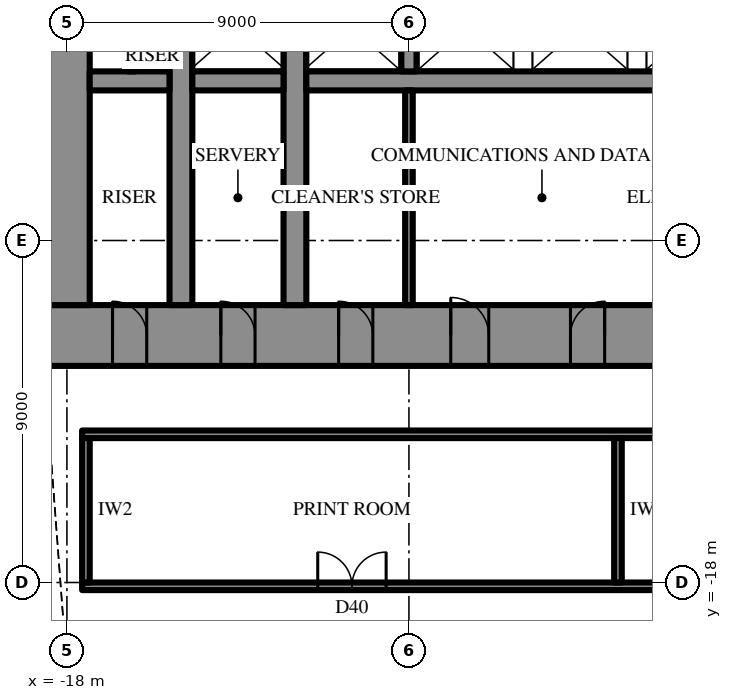
"""IFC4 building model, lengths in metres.
Left out: names, types, materials, properties, quantities, classifications, styles, units other than length and angle.
Written with IfcOpenShell. Run it as: python <this file> out.ifc"""

import sys

from ifc_helpers import new_model, si_unit, direction, frame, frame_2d, origin, place, context, subcontext, project, spatial, rectangle, extrude, element, fill, save


model = new_model("IFC4")
c1 = context("Model", 3, precision=1e-05, world=origin(), true_north=direction((0.0, 1.0)))
c2 = subcontext(c1, "Body", "Model", "MODEL_VIEW")
j1 = project(units=[si_unit("LENGTHUNIT", "METRE"), si_unit("PLANEANGLEUNIT", "RADIAN")], contexts=[c1])
p1 = place(None, origin())
s1 = spatial("IfcSite", under=j1, at=p1, CompositionType="ELEMENT")
p2 = place(p1, origin())
s2 = spatial("IfcBuilding", under=s1, at=p2, CompositionType="ELEMENT")
p3 = place(p2, frame((0.0, 0.0, 153.1)))
s3 = spatial("IfcBuildingStorey", under=s2, at=p3, CompositionType="ELEMENT", Elevation=153.1)
p4 = place(p3, frame((18.6, -11.5, 0.0), z_axis=(0.0, 0.0, 1.0), x_axis=(-1.0, 0.0, 0.0)))
e1 = element("IfcWall", 1, at=p4, inside=s3, PredefinedType="SHEAR", context=c2, shape_type="SweptSolid", body=[
    extrude(rectangle(XDim=37.2, YDim=1.6, at=frame_2d((18.6, 0.0))), origin(), (0.0, 0.0, 1.0), 4.2),
])
p5 = place(p4, frame((19.45, 0.0, 0.0)))
e2 = element("IfcOpeningElement", 2, at=p5, cuts=e1, PredefinedType="OPENING", context=c2, shape_type="SweptSolid", body=[
    extrude(rectangle(XDim=0.9, YDim=2.2, at=frame_2d((0.45, 1.1))), frame((0.0, 0.81, 0.0), z_axis=(0.0, -1.0, 0.0), x_axis=(1.0, 0.0, 0.0)), (0.0, 0.0, 1.0), 1.62),
])
p6 = place(p4, frame((22.45, 0.0, 0.0)))
e3 = element("IfcOpeningElement", 3, at=p6, cuts=e1, PredefinedType="OPENING", context=c2, shape_type="SweptSolid", body=[
    extrude(rectangle(XDim=0.9, YDim=2.2, at=frame_2d((0.45, 1.1))), frame((0.0, 0.81, 0.0), z_axis=(0.0, -1.0, 0.0), x_axis=(1.0, 0.0, 0.0)), (0.0, 0.0, 1.0), 1.62),
])
p7 = place(p4, frame((25.5, 0.0, 0.0)))
e4 = element("IfcOpeningElement", 4, at=p7, cuts=e1, PredefinedType="OPENING", context=c2, shape_type="SweptSolid", body=[
    extrude(rectangle(XDim=1.0, YDim=2.2, at=frame_2d((0.5, 1.1))), frame((0.0, 0.81, 0.0), z_axis=(0.0, -1.0, 0.0), x_axis=(1.0, 0.0, 0.0)), (0.0, 0.0, 1.0), 1.62),
])
p8 = place(p4, frame((1.8, 0.0, 0.0)))
e5 = element("IfcOpeningElement", 5, at=p8, cuts=e1, PredefinedType="OPENING", context=c2, shape_type="SweptSolid", body=[
    extrude(rectangle(XDim=0.9, YDim=2.2, at=frame_2d((0.45, 1.1))), frame((0.0, 0.81, 0.0), z_axis=(0.0, -1.0, 0.0), x_axis=(1.0, 0.0, 0.0)), (0.0, 0.0, 1.0), 1.62),
])
p9 = place(p4, frame((4.65, 0.0, 0.0)))
e6 = element("IfcOpeningElement", 6, at=p9, cuts=e1, PredefinedType="OPENING", context=c2, shape_type="SweptSolid", body=[
    extrude(rectangle(XDim=0.9, YDim=2.2, at=frame_2d((0.45, 1.1))), frame((0.0, 0.81, 0.0), z_axis=(0.0, -1.0, 0.0), x_axis=(1.0, 0.0, 0.0)), (0.0, 0.0, 1.0), 1.62),
])
p10 = place(p4, frame((7.75, 0.0, 0.0)))
e7 = element("IfcOpeningElement", 7, at=p10, cuts=e1, PredefinedType="OPENING", context=c2, shape_type="SweptSolid", body=[
    extrude(rectangle(XDim=0.9, YDim=2.2, at=frame_2d((0.45, 1.1))), frame((0.0, 0.81, 0.0), z_axis=(0.0, -1.0, 0.0), x_axis=(1.0, 0.0, 0.0)), (0.0, 0.0, 1.0), 1.62),
])
p11 = place(p4, frame((28.55, 0.0, 0.0)))
e8 = element("IfcOpeningElement", 8, at=p11, cuts=e1, PredefinedType="OPENING", context=c2, shape_type="SweptSolid", body=[
    extrude(rectangle(XDim=0.9, YDim=2.2, at=frame_2d((0.45, 1.1))), frame((0.0, 0.81, 0.0), z_axis=(0.0, -1.0, 0.0), x_axis=(1.0, 0.0, 0.0)), (0.0, 0.0, 1.0), 1.62),
])
p12 = place(p4, frame((31.65, 0.0, 0.0)))
e9 = element("IfcOpeningElement", 9, at=p12, cuts=e1, PredefinedType="OPENING", context=c2, shape_type="SweptSolid", body=[
    extrude(rectangle(XDim=0.9, YDim=2.2, at=frame_2d((0.45, 1.1))), frame((0.0, 0.81, 0.0), z_axis=(0.0, -1.0, 0.0), x_axis=(1.0, 0.0, 0.0)), (0.0, 0.0, 1.0), 1.62),
])
p13 = place(p4, frame((34.5, 0.0, 0.0)))
e10 = element("IfcOpeningElement", 10, at=p13, cuts=e1, PredefinedType="OPENING", context=c2, shape_type="SweptSolid", body=[
    extrude(rectangle(XDim=0.9, YDim=2.2, at=frame_2d((0.45, 1.1))), frame((0.0, 0.81, 0.0), z_axis=(0.0, -1.0, 0.0), x_axis=(1.0, 0.0, 0.0)), (0.0, 0.0, 1.0), 1.62),
])
p14 = place(p3, frame((-18.0, 10.7, 0.0), z_axis=(0.0, 0.0, 1.0), x_axis=(0.0, -1.0, 0.0)))
e11 = element("IfcWall", 11, at=p14, inside=s3, PredefinedType="SHEAR", context=c2, shape_type="SweptSolid", body=[
    extrude(rectangle(XDim=21.4, YDim=1.2, at=frame_2d((10.7, 0.0))), origin(), (0.0, 0.0, 1.0), 4.2),
])
p15 = place(p14, frame((9.8, 0.0, 0.0)))
e12 = element("IfcOpeningElement", 12, at=p15, cuts=e11, PredefinedType="OPENING", context=c2, shape_type="SweptSolid", body=[
    extrude(rectangle(XDim=1.8, YDim=2.4, at=frame_2d((0.9, 1.2))), frame((0.0, 0.61, 0.0), z_axis=(0.0, -1.0, 0.0), x_axis=(1.0, 0.0, 0.0)), (0.0, 0.0, 1.0), 1.22),
])
p16 = place(p3, frame((-12.0, -10.7, 0.0), z_axis=(0.0, 0.0, 1.0), x_axis=(0.0, 1.0, 0.0)))
e13 = element("IfcWall", 13, at=p16, inside=s3, PredefinedType="SHEAR", context=c2, shape_type="SweptSolid", body=[
    extrude(rectangle(XDim=21.4, YDim=0.6, at=frame_2d((10.7, 0.0))), origin(), (0.0, 0.0, 1.0), 4.2),
])
p17 = place(p16, frame((9.8, 0.0, 0.0)))
e14 = element("IfcOpeningElement", 14, at=p17, cuts=e13, PredefinedType="OPENING", context=c2, shape_type="SweptSolid", body=[
    extrude(rectangle(XDim=1.8, YDim=2.4, at=frame_2d((0.9, 1.2))), frame((0.0, 0.31, 0.0), z_axis=(0.0, -1.0, 0.0), x_axis=(1.0, 0.0, 0.0)), (0.0, 0.0, 1.0), 0.62),
])
p18 = place(p3, frame((-15.0, -10.7, 0.0), z_axis=(0.0, 0.0, 1.0), x_axis=(0.0, 1.0, 0.0)))
e15 = element("IfcWall", 15, at=p18, inside=s3, PredefinedType="SHEAR", context=c2, shape_type="SweptSolid", body=[
    extrude(rectangle(XDim=21.4, YDim=0.6, at=frame_2d((10.7, 0.0))), origin(), (0.0, 0.0, 1.0), 4.2),
])
p19 = place(p18, frame((9.8, 0.0, 0.0)))
e16 = element("IfcOpeningElement", 16, at=p19, cuts=e15, PredefinedType="OPENING", context=c2, shape_type="SweptSolid", body=[
    extrude(rectangle(XDim=1.8, YDim=2.4, at=frame_2d((0.9, 1.2))), frame((0.0, 0.31, 0.0), z_axis=(0.0, -1.0, 0.0), x_axis=(1.0, 0.0, 0.0)), (0.0, 0.0, 1.0), 0.62),
])
p20 = place(p3, frame((11.7, -4.8, 0.0), z_axis=(0.0, 0.0, 1.0), x_axis=(-1.0, 0.0, 0.0)))
e17 = element("IfcWall", 17, at=p20, inside=s3, PredefinedType="SHEAR", context=c2, shape_type="SweptSolid", body=[
    extrude(rectangle(XDim=23.4, YDim=0.5, at=frame_2d((11.7, 0.0))), origin(), (0.0, 0.0, 1.0), 4.2),
])
p21 = place(p20, frame((6.6, 0.0, 0.0)))
e18 = element("IfcOpeningElement", 18, at=p21, cuts=e17, PredefinedType="OPENING", context=c2, shape_type="SweptSolid", body=[
    extrude(rectangle(XDim=1.2, YDim=2.2, at=frame_2d((0.6, 1.1))), frame((0.0, 0.26, 0.0), z_axis=(0.0, -1.0, 0.0), x_axis=(1.0, 0.0, 0.0)), (0.0, 0.0, 1.0), 0.52),
])
p22 = place(p20, frame((3.6, 0.0, 0.0)))
e19 = element("IfcOpeningElement", 19, at=p22, cuts=e17, PredefinedType="OPENING", context=c2, shape_type="SweptSolid", body=[
    extrude(rectangle(XDim=1.2, YDim=2.2, at=frame_2d((0.6, 1.1))), frame((0.0, 0.26, 0.0), z_axis=(0.0, -1.0, 0.0), x_axis=(1.0, 0.0, 0.0)), (0.0, 0.0, 1.0), 0.52),
])
p23 = place(p3, frame((-12.3, -4.8, 0.0), z_axis=(0.0, 0.0, 1.0), x_axis=(-1.0, 0.0, 0.0)))
e20 = element("IfcWall", 20, at=p23, inside=s3, PredefinedType="SHEAR", context=c2, shape_type="SweptSolid", body=[
    extrude(rectangle(XDim=2.4, YDim=0.5, at=frame_2d((1.2, 0.0))), origin(), (0.0, 0.0, 1.0), 4.2),
])
p24 = place(p3, frame((-15.3, -4.8, 0.0), z_axis=(0.0, 0.0, 1.0), x_axis=(-1.0, 0.0, 0.0)))
e21 = element("IfcWall", 21, at=p24, inside=s3, PredefinedType="SHEAR", context=c2, shape_type="SweptSolid", body=[
    extrude(rectangle(XDim=2.1, YDim=0.5, at=frame_2d((1.05, 0.0))), origin(), (0.0, 0.0, 1.0), 4.2),
])
p25 = place(p3, frame((-9.0, -2.25, 0.0), z_axis=(0.0, 0.0, 1.0), x_axis=(0.0, -1.0, 0.0)))
e22 = element("IfcWall", 22, at=p25, inside=s3, PredefinedType="SHEAR", context=c2, shape_type="SweptSolid", body=[
    extrude(rectangle(XDim=2.3, YDim=0.4, at=frame_2d((1.15, 0.0))), origin(), (0.0, 0.0, 1.0), 4.2),
])
p26 = place(p3, frame((-9.0, -5.05, 0.0), z_axis=(0.0, 0.0, 1.0), x_axis=(0.0, -1.0, 0.0)))
e23 = element("IfcWall", 23, at=p26, inside=s3, PredefinedType="PARTITIONING", context=c2, shape_type="SweptSolid", body=[
    extrude(rectangle(XDim=5.65, YDim=0.2, at=frame_2d((2.825, 0.0))), origin(), (0.0, 0.0, 1.0), 4.0),
])
p27 = place(p3, frame((-16.3, -3.55, 0.0), z_axis=(0.0, 0.0, 1.0), x_axis=(0.0, -1.0, 0.0)))
e24 = element("IfcWall", 24, at=p27, inside=s3, PredefinedType="PARTITIONING", context=c2, shape_type="SweptSolid", body=[
    extrude(rectangle(XDim=1.0, YDim=0.2, at=frame_2d((0.5, 0.0))), origin(), (0.0, 0.0, 1.0), 4.0),
])
p28 = place(p3, frame((17.6, -14.1, 0.0), z_axis=(0.0, 0.0, 1.0), x_axis=(-1.0, 0.0, 0.0)))
e25 = element("IfcWall", 25, at=p28, inside=s3, PredefinedType="PARTITIONING", context=c2, shape_type="SweptSolid", body=[
    extrude(rectangle(XDim=35.2, YDim=0.2, at=frame_2d((17.6, 0.0))), origin(), (0.0, 0.0, 1.0), 4.0),
])
p29 = place(p3, frame((17.6, -18.1, 0.0), z_axis=(0.0, 0.0, 1.0), x_axis=(-1.0, 0.0, 0.0)))
e26 = element("IfcWall", 26, at=p29, inside=s3, PredefinedType="PARTITIONING", context=c2, shape_type="SweptSolid", body=[
    extrude(rectangle(XDim=35.2, YDim=0.2, at=frame_2d((17.6, 0.0))), origin(), (0.0, 0.0, 1.0), 4.0),
])
p30 = place(p29, frame((9.7, 0.0, 0.0)))
e27 = element("IfcOpeningElement", 27, at=p30, cuts=e26, PredefinedType="OPENING", context=c2, shape_type="SweptSolid", body=[
    extrude(rectangle(XDim=1.8, YDim=2.4, at=frame_2d((0.9, 1.2))), frame((0.0, 0.11, 0.0), z_axis=(0.0, -1.0, 0.0), x_axis=(1.0, 0.0, 0.0)), (0.0, 0.0, 1.0), 0.22),
])
p31 = place(p29, frame((27.2, 0.0, 0.0)))
e28 = element("IfcOpeningElement", 28, at=p31, cuts=e26, PredefinedType="OPENING", context=c2, shape_type="SweptSolid", body=[
    extrude(rectangle(XDim=1.8, YDim=2.4, at=frame_2d((0.9, 1.2))), frame((0.0, 0.11, 0.0), z_axis=(0.0, -1.0, 0.0), x_axis=(1.0, 0.0, 0.0)), (0.0, 0.0, 1.0), 0.22),
])
for number, where, z_axis, x_axis in (
    (29, (-3.5, -14.2, 0.0), (0.0, 0.0, 1.0), (0.0, -1.0, 0.0)),
    (30, (-17.5, -14.2, 0.0), (0.0, 0.0, 1.0), (0.0, -1.0, 0.0)),
):
    element("IfcWall", number, at=place(p3, frame(where, z_axis=z_axis, x_axis=x_axis)), inside=s3, PredefinedType="PARTITIONING", context=c2, shape_type="SweptSolid", body=[
        extrude(rectangle(XDim=3.8, YDim=0.2, at=frame_2d((1.9, 0.0))), origin(), (0.0, 0.0, 1.0), 4.0),
    ])
p32 = place(p6, frame((0.9, 0.0, 0.0), z_axis=(0.0, 0.0, 1.0), x_axis=(-1.0, 0.0, 0.0)))
e31 = element("IfcDoor", 31, at=p32, inside=s3, OperationType="SINGLE_SWING_LEFT", PredefinedType="DOOR", context=c2, shape_type="SweptSolid", body=[
    extrude(rectangle(XDim=0.9, YDim=2.2, at=frame_2d((0.45, 1.1))), frame((0.0, 0.025, 0.0), z_axis=(0.0, -1.0, 0.0), x_axis=(1.0, 0.0, 0.0)), (0.0, 0.0, 1.0), 0.05),
])
fill(e3, e31)
p33 = place(p7, frame((1.0, 0.0, 0.0), z_axis=(0.0, 0.0, 1.0), x_axis=(-1.0, 0.0, 0.0)))
e32 = element("IfcDoor", 32, at=p33, inside=s3, OperationType="SINGLE_SWING_RIGHT", PredefinedType="DOOR", context=c2, shape_type="SweptSolid", body=[
    extrude(rectangle(XDim=1.0, YDim=2.2, at=frame_2d((0.5, 1.1))), frame((0.0, 0.025, 0.0), z_axis=(0.0, -1.0, 0.0), x_axis=(1.0, 0.0, 0.0)), (0.0, 0.0, 1.0), 0.05),
])
fill(e4, e32)
p34 = place(p11, frame((0.9, 0.0, 0.0), z_axis=(0.0, 0.0, 1.0), x_axis=(-1.0, 0.0, 0.0)))
e33 = element("IfcDoor", 33, at=p34, inside=s3, OperationType="SINGLE_SWING_RIGHT", PredefinedType="DOOR", context=c2, shape_type="SweptSolid", body=[
    extrude(rectangle(XDim=0.9, YDim=2.2, at=frame_2d((0.45, 1.1))), frame((0.0, 0.025, 0.0), z_axis=(0.0, -1.0, 0.0), x_axis=(1.0, 0.0, 0.0)), (0.0, 0.0, 1.0), 0.05),
])
fill(e8, e33)
p35 = place(p12, frame((0.9, 0.0, 0.0), z_axis=(0.0, 0.0, 1.0), x_axis=(-1.0, 0.0, 0.0)))
e34 = element("IfcDoor", 34, at=p35, inside=s3, OperationType="SINGLE_SWING_RIGHT", PredefinedType="DOOR", context=c2, shape_type="SweptSolid", body=[
    extrude(rectangle(XDim=0.9, YDim=2.2, at=frame_2d((0.45, 1.1))), frame((0.0, 0.025, 0.0), z_axis=(0.0, -1.0, 0.0), x_axis=(1.0, 0.0, 0.0)), (0.0, 0.0, 1.0), 0.05),
])
fill(e9, e34)
p36 = place(p13, frame((0.9, 0.0, 0.0), z_axis=(0.0, 0.0, 1.0), x_axis=(-1.0, 0.0, 0.0)))
e35 = element("IfcDoor", 35, at=p36, inside=s3, OperationType="SINGLE_SWING_RIGHT", PredefinedType="DOOR", context=c2, shape_type="SweptSolid", body=[
    extrude(rectangle(XDim=0.9, YDim=2.2, at=frame_2d((0.45, 1.1))), frame((0.0, 0.025, 0.0), z_axis=(0.0, -1.0, 0.0), x_axis=(1.0, 0.0, 0.0)), (0.0, 0.0, 1.0), 0.05),
])
fill(e10, e35)
p37 = place(p31, frame((1.8, 0.0, 0.0), z_axis=(0.0, 0.0, 1.0), x_axis=(-1.0, 0.0, 0.0)))
e36 = element("IfcDoor", 36, at=p37, inside=s3, OperationType="DOUBLE_DOOR_SINGLE_SWING", PredefinedType="DOOR", context=c2, shape_type="SweptSolid", body=[
    extrude(rectangle(XDim=1.8, YDim=2.4, at=frame_2d((0.9, 1.2))), frame((0.0, 0.025, 0.0), z_axis=(0.0, -1.0, 0.0), x_axis=(1.0, 0.0, 0.0)), (0.0, 0.0, 1.0), 0.05),
])
fill(e28, e36)
save(model, sys.argv[1])
